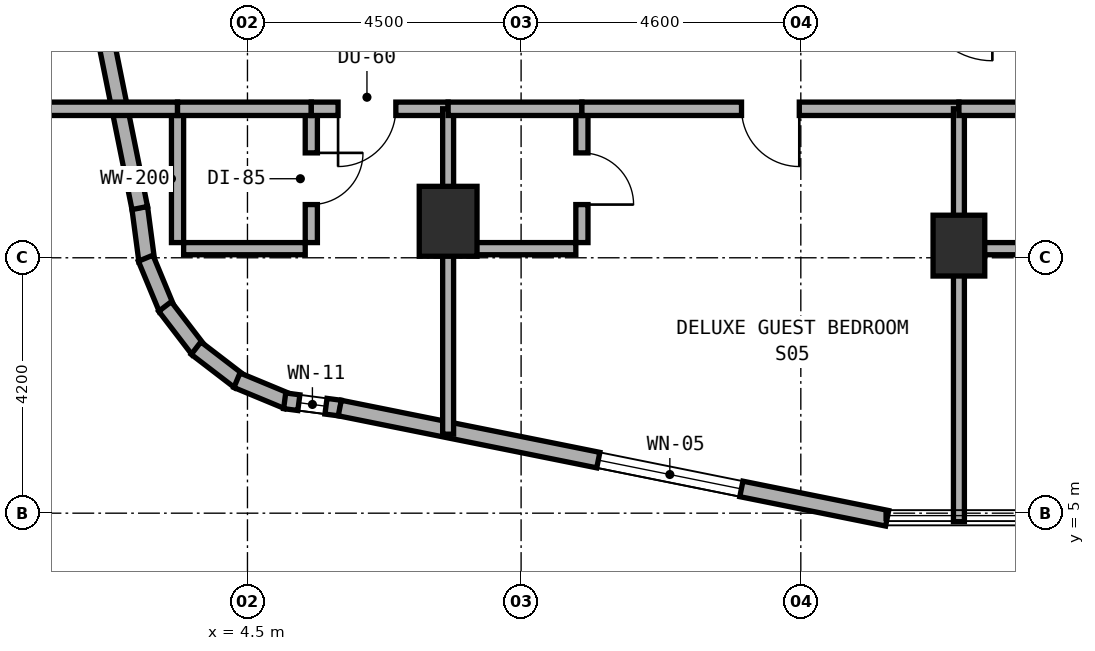
"""IFC4 building model, lengths in metres.
Left out: names, types, materials, properties, quantities, classifications, styles, units other than length and angle.
Written with IfcOpenShell. Run it as: python <this file> out.ifc"""

import sys

from ifc_helpers import new_model, si_unit, direction, frame, frame_2d, origin, origin_2d, place, context, subcontext, project, spatial, rectangle, extrude, element, fill, save


model = new_model("IFC4")
c1 = context("Model", 3, precision=1e-05, world=origin(), true_north=direction((0.0, 1.0)))
c2 = subcontext(c1, "Body", "Model", "MODEL_VIEW")
j1 = project(units=[si_unit("LENGTHUNIT", "METRE"), si_unit("PLANEANGLEUNIT", "RADIAN")], contexts=[c1])
p1 = place(None, origin())
s1 = spatial("IfcSite", under=j1, at=p1, CompositionType="ELEMENT")
p2 = place(p1, origin())
s2 = spatial("IfcBuilding", under=s1, at=p2, CompositionType="ELEMENT")
p3 = place(p2, frame((0.0, 0.0, 127.5)))
s3 = spatial("IfcBuildingStorey", under=s2, at=p3, CompositionType="ELEMENT", Elevation=127.5)
p4 = place(p3, frame((16.2, 9.4, 0.0), z_axis=(0.0, 0.0, 1.0), x_axis=(1.0, 0.0, 0.0)))
e1 = element("IfcColumn", 1, at=p4, inside=s3, PredefinedType="COLUMN", context=c2, shape_type="SweptSolid", body=[
    extrude(rectangle(XDim=0.85, YDim=1.0, at=origin_2d()), origin(), (0.0, 0.0, 1.0), 3.5),
])
p5 = place(p3, frame((7.8, 9.8, 0.0), z_axis=(0.0, 0.0, 1.0), x_axis=(1.0, 0.0, 0.0)))
e2 = element("IfcColumn", 2, at=p5, inside=s3, PredefinedType="COLUMN", context=c2, shape_type="SweptSolid", body=[
    extrude(rectangle(XDim=0.95, YDim=1.15, at=origin_2d()), origin(), (0.0, 0.0, 1.0), 3.5),
])
p6 = place(p3, frame((2.728, 10.025, 0.0), z_axis=(0.0, 0.0, 1.0), x_axis=(0.130953706898, -0.991388484223, 0.0)))
e3 = element("IfcWall", 3, at=p6, inside=s3, PredefinedType="STANDARD", context=c2, shape_type="SweptSolid", body=[
    extrude(rectangle(XDim=0.885, YDim=0.26, at=frame_2d((0.443, 0.0))), origin(), (0.0, 0.0, 1.0), 3.22),
])
p7 = place(p3, frame((2.826, 9.193, 0.0), z_axis=(0.0, 0.0, 1.0), x_axis=(0.383290660547, -0.923627776508, 0.0)))
e4 = element("IfcWall", 4, at=p7, inside=s3, PredefinedType="STANDARD", context=c2, shape_type="SweptSolid", body=[
    extrude(rectangle(XDim=0.903, YDim=0.26, at=frame_2d((0.452, 0.0))), origin(), (0.0, 0.0, 1.0), 3.22),
])
p8 = place(p3, frame((3.144, 8.399, 0.0), z_axis=(0.0, 0.0, 1.0), x_axis=(0.608624690463, -0.793458244748, 0.0)))
e5 = element("IfcWall", 5, at=p8, inside=s3, PredefinedType="STANDARD", context=c2, shape_type="SweptSolid", body=[
    extrude(rectangle(XDim=0.902, YDim=0.26, at=frame_2d((0.451, 0.0))), origin(), (0.0, 0.0, 1.0), 3.22),
])
p9 = place(p3, frame((3.655, 7.714, 0.0), z_axis=(0.0, 0.0, 1.0), x_axis=(0.793558456666, -0.608494022858, 0.0)))
e6 = element("IfcWall", 6, at=p9, inside=s3, PredefinedType="STANDARD", context=c2, shape_type="SweptSolid", body=[
    extrude(rectangle(XDim=0.902, YDim=0.26, at=frame_2d((0.451, 0.0))), origin(), (0.0, 0.0, 1.0), 3.22),
])
p10 = place(p3, frame((4.327, 7.186, 0.0), z_axis=(0.0, 0.0, 1.0), x_axis=(0.923683767999, -0.383155708213, 0.0)))
e7 = element("IfcWall", 7, at=p10, inside=s3, PredefinedType="STANDARD", context=c2, shape_type="SweptSolid", body=[
    extrude(rectangle(XDim=0.903, YDim=0.26, at=frame_2d((0.451, 0.0))), origin(), (0.0, 0.0, 1.0), 3.22),
])
p11 = place(p3, frame((5.112, 6.848, 0.0), z_axis=(0.0, 0.0, 1.0), x_axis=(0.991487658083, -0.130200706103, 0.0)))
e8 = element("IfcWall", 8, at=p11, inside=s3, PredefinedType="STANDARD", context=c2, shape_type="SweptSolid", body=[
    extrude(rectangle(XDim=0.921, YDim=0.26, at=frame_2d((0.46, 0.0))), origin(), (0.0, 0.0, 1.0), 3.22),
])
p12 = place(p11, frame((0.235, 0.0, 0.85)))
e9 = element("IfcOpeningElement", 9, at=p12, cuts=e8, PredefinedType="OPENING", context=c2, shape_type="SweptSolid", body=[
    extrude(rectangle(XDim=0.45, YDim=1.5, at=frame_2d((0.225, 0.75))), frame((0.0, 0.14, 0.0), z_axis=(0.0, -1.0, 0.0), x_axis=(1.0, 0.0, 0.0)), (0.0, 0.0, 1.0), 0.28),
])
p13 = place(p3, frame((6.018, 6.729, 0.0), z_axis=(0.0, 0.0, 1.0), x_axis=(0.980315963543, -0.197435082048, 0.0)))
e10 = element("IfcWall", 10, at=p13, inside=s3, PredefinedType="STANDARD", context=c2, shape_type="SweptSolid", body=[
    extrude(rectangle(XDim=9.183, YDim=0.26, at=frame_2d((4.591, 0.0))), origin(), (0.0, 0.0, 1.0), 3.22),
])
p14 = place(p13, frame((4.337, 0.0, 0.8)))
e11 = element("IfcOpeningElement", 11, at=p14, cuts=e10, PredefinedType="OPENING", context=c2, shape_type="SweptSolid", body=[
    extrude(rectangle(XDim=2.4, YDim=1.6, at=frame_2d((1.2, 0.8))), frame((0.0, 0.14, 0.0), z_axis=(0.0, -1.0, 0.0), x_axis=(1.0, 0.0, 0.0)), (0.0, 0.0, 1.0), 0.28),
])
p15 = place(p3, frame((0.916, 19.02, 0.0), z_axis=(0.0, 0.0, 1.0), x_axis=(0.197435082048, -0.980315963543, 0.0)))
e12 = element("IfcWall", 12, at=p15, inside=s3, PredefinedType="STANDARD", context=c2, shape_type="SweptSolid", body=[
    extrude(rectangle(XDim=9.183, YDim=0.26, at=frame_2d((4.591, 0.0))), origin(), (0.0, 0.0, 1.0), 3.22),
])
p16 = place(p15, frame((2.497, 0.0, 0.8)))
e13 = element("IfcOpeningElement", 13, at=p16, cuts=e12, PredefinedType="OPENING", context=c2, shape_type="SweptSolid", body=[
    extrude(rectangle(XDim=2.4, YDim=1.6, at=frame_2d((1.2, 0.8))), frame((0.0, 0.14, 0.0), z_axis=(0.0, -1.0, 0.0), x_axis=(1.0, 0.0, 0.0)), (0.0, 0.0, 1.0), 0.28),
])
p17 = place(p3, frame((5.55, 9.45, 0.0), z_axis=(0.0, 0.0, 1.0), x_axis=(0.0, 1.0, 0.0)))
e14 = element("IfcWall", 14, at=p17, inside=s3, PredefinedType="PLUMBINGWALL", context=c2, shape_type="SweptSolid", body=[
    extrude(rectangle(XDim=2.1, YDim=0.2, at=frame_2d((1.05, 0.0))), origin(), (0.0, 0.0, 1.0), 3.22),
])
p18 = place(p17, frame((0.625, 0.0, 0.0)))
e15 = element("IfcOpeningElement", 15, at=p18, cuts=e14, PredefinedType="OPENING", context=c2, shape_type="SweptSolid", body=[
    extrude(rectangle(XDim=0.85, YDim=2.1, at=frame_2d((0.425, 1.05))), frame((0.0, 0.11, 0.0), z_axis=(0.0, -1.0, 0.0), x_axis=(1.0, 0.0, 0.0)), (0.0, 0.0, 1.0), 0.22),
])
p19 = place(p3, frame((3.45, 9.35, 0.0), z_axis=(0.0, 0.0, 1.0), x_axis=(1.0, 0.0, 0.0)))
e16 = element("IfcWall", 16, at=p19, inside=s3, PredefinedType="PLUMBINGWALL", context=c2, shape_type="SweptSolid", body=[
    extrude(rectangle(XDim=2.0, YDim=0.2, at=frame_2d((1.0, 0.0))), origin(), (0.0, 0.0, 1.0), 3.22),
])
p20 = place(p3, frame((3.35, 9.45, 0.0), z_axis=(0.0, 0.0, 1.0), x_axis=(0.0, 1.0, 0.0)))
e17 = element("IfcWall", 17, at=p20, inside=s3, PredefinedType="PLUMBINGWALL", context=c2, shape_type="SweptSolid", body=[
    extrude(rectangle(XDim=2.1, YDim=0.2, at=frame_2d((1.05, 0.0))), origin(), (0.0, 0.0, 1.0), 3.22),
])
p21 = place(p3, frame((0.96, 11.65, 0.0), z_axis=(0.0, 0.0, 1.0), x_axis=(1.0, 0.0, 0.0)))
e18 = element("IfcWall", 18, at=p21, inside=s3, PredefinedType="SOLIDWALL", context=c2, shape_type="SweptSolid", body=[
    extrude(rectangle(XDim=2.39, YDim=0.22, at=frame_2d((1.195, 0.0))), origin(), (0.0, 0.0, 1.0), 3.22),
])
p22 = place(p3, frame((3.35, 11.65, 0.0), z_axis=(0.0, 0.0, 1.0), x_axis=(1.0, 0.0, 0.0)))
e19 = element("IfcWall", 19, at=p22, inside=s3, PredefinedType="SOLIDWALL", context=c2, shape_type="SweptSolid", body=[
    extrude(rectangle(XDim=2.2, YDim=0.22, at=frame_2d((1.1, 0.0))), origin(), (0.0, 0.0, 1.0), 3.22),
])
p23 = place(p3, frame((5.55, 11.65, 0.0), z_axis=(0.0, 0.0, 1.0), x_axis=(1.0, 0.0, 0.0)))
e20 = element("IfcWall", 20, at=p23, inside=s3, PredefinedType="SOLIDWALL", context=c2, shape_type="SweptSolid", body=[
    extrude(rectangle(XDim=2.25, YDim=0.22, at=frame_2d((1.125, 0.0))), origin(), (0.0, 0.0, 1.0), 2.695),
])
p24 = place(p23, frame((0.44, 0.0, 0.0)))
e21 = element("IfcOpeningElement", 21, at=p24, cuts=e20, PredefinedType="OPENING", context=c2, shape_type="SweptSolid", body=[
    extrude(rectangle(XDim=0.95, YDim=2.1, at=frame_2d((0.475, 1.05))), frame((0.0, 0.12, 0.0), z_axis=(0.0, -1.0, 0.0), x_axis=(1.0, 0.0, 0.0)), (0.0, 0.0, 1.0), 0.24),
])
p25 = place(p3, frame((7.8, 6.299, 0.0), z_axis=(0.0, 0.0, 1.0), x_axis=(0.0, 1.0, 0.0)))
e22 = element("IfcWall", 22, at=p25, inside=s3, PredefinedType="SOLIDWALL", context=c2, shape_type="SweptSolid", body=[
    extrude(rectangle(XDim=5.351, YDim=0.18, at=frame_2d((2.675, 0.0))), origin(), (0.0, 0.0, 1.0), 2.695),
])
p26 = place(p3, frame((10.0, 9.45, 0.0), z_axis=(0.0, 0.0, 1.0), x_axis=(0.0, 1.0, 0.0)))
e23 = element("IfcWall", 23, at=p26, inside=s3, PredefinedType="PLUMBINGWALL", context=c2, shape_type="SweptSolid", body=[
    extrude(rectangle(XDim=2.1, YDim=0.2, at=frame_2d((1.05, 0.0))), origin(), (0.0, 0.0, 1.0), 2.745),
])
p27 = place(p26, frame((0.625, 0.0, 0.0)))
e24 = element("IfcOpeningElement", 24, at=p27, cuts=e23, PredefinedType="OPENING", context=c2, shape_type="SweptSolid", body=[
    extrude(rectangle(XDim=0.85, YDim=2.1, at=frame_2d((0.425, 1.05))), frame((0.0, 0.11, 0.0), z_axis=(0.0, -1.0, 0.0), x_axis=(1.0, 0.0, 0.0)), (0.0, 0.0, 1.0), 0.22),
])
p28 = place(p3, frame((7.9, 9.35, 0.0), z_axis=(0.0, 0.0, 1.0), x_axis=(1.0, 0.0, 0.0)))
e25 = element("IfcWall", 25, at=p28, inside=s3, PredefinedType="PLUMBINGWALL", context=c2, shape_type="SweptSolid", body=[
    extrude(rectangle(XDim=2.0, YDim=0.2, at=frame_2d((1.0, 0.0))), origin(), (0.0, 0.0, 1.0), 3.22),
])
p29 = place(p3, frame((7.8, 11.65, 0.0), z_axis=(0.0, 0.0, 1.0), x_axis=(1.0, 0.0, 0.0)))
e26 = element("IfcWall", 26, at=p29, inside=s3, PredefinedType="SOLIDWALL", context=c2, shape_type="SweptSolid", body=[
    extrude(rectangle(XDim=2.2, YDim=0.22, at=frame_2d((1.1, 0.0))), origin(), (0.0, 0.0, 1.0), 2.695),
])
p30 = place(p3, frame((10.0, 11.65, 0.0), z_axis=(0.0, 0.0, 1.0), x_axis=(1.0, 0.0, 0.0)))
e27 = element("IfcWall", 27, at=p30, inside=s3, PredefinedType="SOLIDWALL", context=c2, shape_type="SweptSolid", body=[
    extrude(rectangle(XDim=6.2, YDim=0.22, at=frame_2d((3.1, 0.0))), origin(), (0.0, 0.0, 1.0), 2.695),
])
p31 = place(p30, frame((2.625, 0.0, 0.0)))
e28 = element("IfcOpeningElement", 28, at=p31, cuts=e27, PredefinedType="OPENING", context=c2, shape_type="SweptSolid", body=[
    extrude(rectangle(XDim=0.95, YDim=2.1, at=frame_2d((0.475, 1.05))), frame((0.0, 0.12, 0.0), z_axis=(0.0, -1.0, 0.0), x_axis=(1.0, 0.0, 0.0)), (0.0, 0.0, 1.0), 0.24),
])
p32 = place(p3, frame((16.2, 4.86, 0.0), z_axis=(0.0, 0.0, 1.0), x_axis=(0.0, 1.0, 0.0)))
e29 = element("IfcWall", 29, at=p32, inside=s3, PredefinedType="SOLIDWALL", context=c2, shape_type="SweptSolid", body=[
    extrude(rectangle(XDim=6.79, YDim=0.18, at=frame_2d((3.395, 0.0))), origin(), (0.0, 0.0, 1.0), 2.695),
])
p33 = place(p3, frame((16.3, 9.35, 0.0), z_axis=(0.0, 0.0, 1.0), x_axis=(1.0, 0.0, 0.0)))
e30 = element("IfcWall", 30, at=p33, inside=s3, PredefinedType="PLUMBINGWALL", context=c2, shape_type="SweptSolid", body=[
    extrude(rectangle(XDim=2.0, YDim=0.2, at=frame_2d((1.0, 0.0))), origin(), (0.0, 0.0, 1.0), 2.835),
])
p34 = place(p3, frame((16.2, 11.65, 0.0), z_axis=(0.0, 0.0, 1.0), x_axis=(1.0, 0.0, 0.0)))
e31 = element("IfcWall", 31, at=p34, inside=s3, PredefinedType="SOLIDWALL", context=c2, shape_type="SweptSolid", body=[
    extrude(rectangle(XDim=2.2, YDim=0.22, at=frame_2d((1.1, 0.0))), origin(), (0.0, 0.0, 1.0), 2.695),
])
p35 = place(p14, origin())
e32 = element("IfcWindow", 32, at=p35, inside=s3, PartitioningType="SINGLE_PANEL", PredefinedType="WINDOW", context=c2, shape_type="SweptSolid", body=[
    extrude(rectangle(XDim=2.4, YDim=1.6, at=frame_2d((1.2, 0.8))), frame((0.0, 0.03, 0.0), z_axis=(0.0, -1.0, 0.0), x_axis=(1.0, 0.0, 0.0)), (0.0, 0.0, 1.0), 0.06),
])
fill(e11, e32)
p36 = place(p12, origin())
e33 = element("IfcWindow", 33, at=p36, inside=s3, PartitioningType="SINGLE_PANEL", PredefinedType="WINDOW", context=c2, shape_type="SweptSolid", body=[
    extrude(rectangle(XDim=0.45, YDim=1.5, at=frame_2d((0.225, 0.75))), frame((0.0, 0.03, 0.0), z_axis=(0.0, -1.0, 0.0), x_axis=(1.0, 0.0, 0.0)), (0.0, 0.0, 1.0), 0.06),
])
fill(e9, e33)
p37 = place(p18, frame((0.85, 0.0, 0.0), z_axis=(0.0, 0.0, 1.0), x_axis=(-1.0, 0.0, 0.0)))
e34 = element("IfcDoor", 34, at=p37, inside=s3, OperationType="SINGLE_SWING_LEFT", PredefinedType="DOOR", context=c2, shape_type="SweptSolid", body=[
    extrude(rectangle(XDim=0.85, YDim=2.1, at=frame_2d((0.425, 1.05))), frame((0.0, 0.025, 0.0), z_axis=(0.0, -1.0, 0.0), x_axis=(1.0, 0.0, 0.0)), (0.0, 0.0, 1.0), 0.05),
])
fill(e15, e34)
p38 = place(p24, frame((0.95, 0.0, 0.0), z_axis=(0.0, 0.0, 1.0), x_axis=(-1.0, 0.0, 0.0)))
e35 = element("IfcDoor", 35, at=p38, inside=s3, OperationType="SINGLE_SWING_RIGHT", PredefinedType="DOOR", context=c2, shape_type="SweptSolid", body=[
    extrude(rectangle(XDim=0.95, YDim=2.1, at=frame_2d((0.475, 1.05))), frame((0.0, 0.025, 0.0), z_axis=(0.0, -1.0, 0.0), x_axis=(1.0, 0.0, 0.0)), (0.0, 0.0, 1.0), 0.05),
])
fill(e21, e35)
p39 = place(p27, frame((0.85, 0.0, 0.0), z_axis=(0.0, 0.0, 1.0), x_axis=(-1.0, 0.0, 0.0)))
e36 = element("IfcDoor", 36, at=p39, inside=s3, OperationType="SINGLE_SWING_RIGHT", PredefinedType="DOOR", context=c2, shape_type="SweptSolid", body=[
    extrude(rectangle(XDim=0.85, YDim=2.1, at=frame_2d((0.425, 1.05))), frame((0.0, 0.025, 0.0), z_axis=(0.0, -1.0, 0.0), x_axis=(1.0, 0.0, 0.0)), (0.0, 0.0, 1.0), 0.05),
])
fill(e24, e36)
p40 = place(p31, frame((0.95, 0.0, 0.0), z_axis=(0.0, 0.0, 1.0), x_axis=(-1.0, 0.0, 0.0)))
e37 = element("IfcDoor", 37, at=p40, inside=s3, OperationType="SINGLE_SWING_LEFT", PredefinedType="DOOR", context=c2, shape_type="SweptSolid", body=[
    extrude(rectangle(XDim=0.95, YDim=2.1, at=frame_2d((0.475, 1.05))), frame((0.0, 0.025, 0.0), z_axis=(0.0, -1.0, 0.0), x_axis=(1.0, 0.0, 0.0)), (0.0, 0.0, 1.0), 0.05),
])
fill(e28, e37)
save(model, sys.argv[1])
